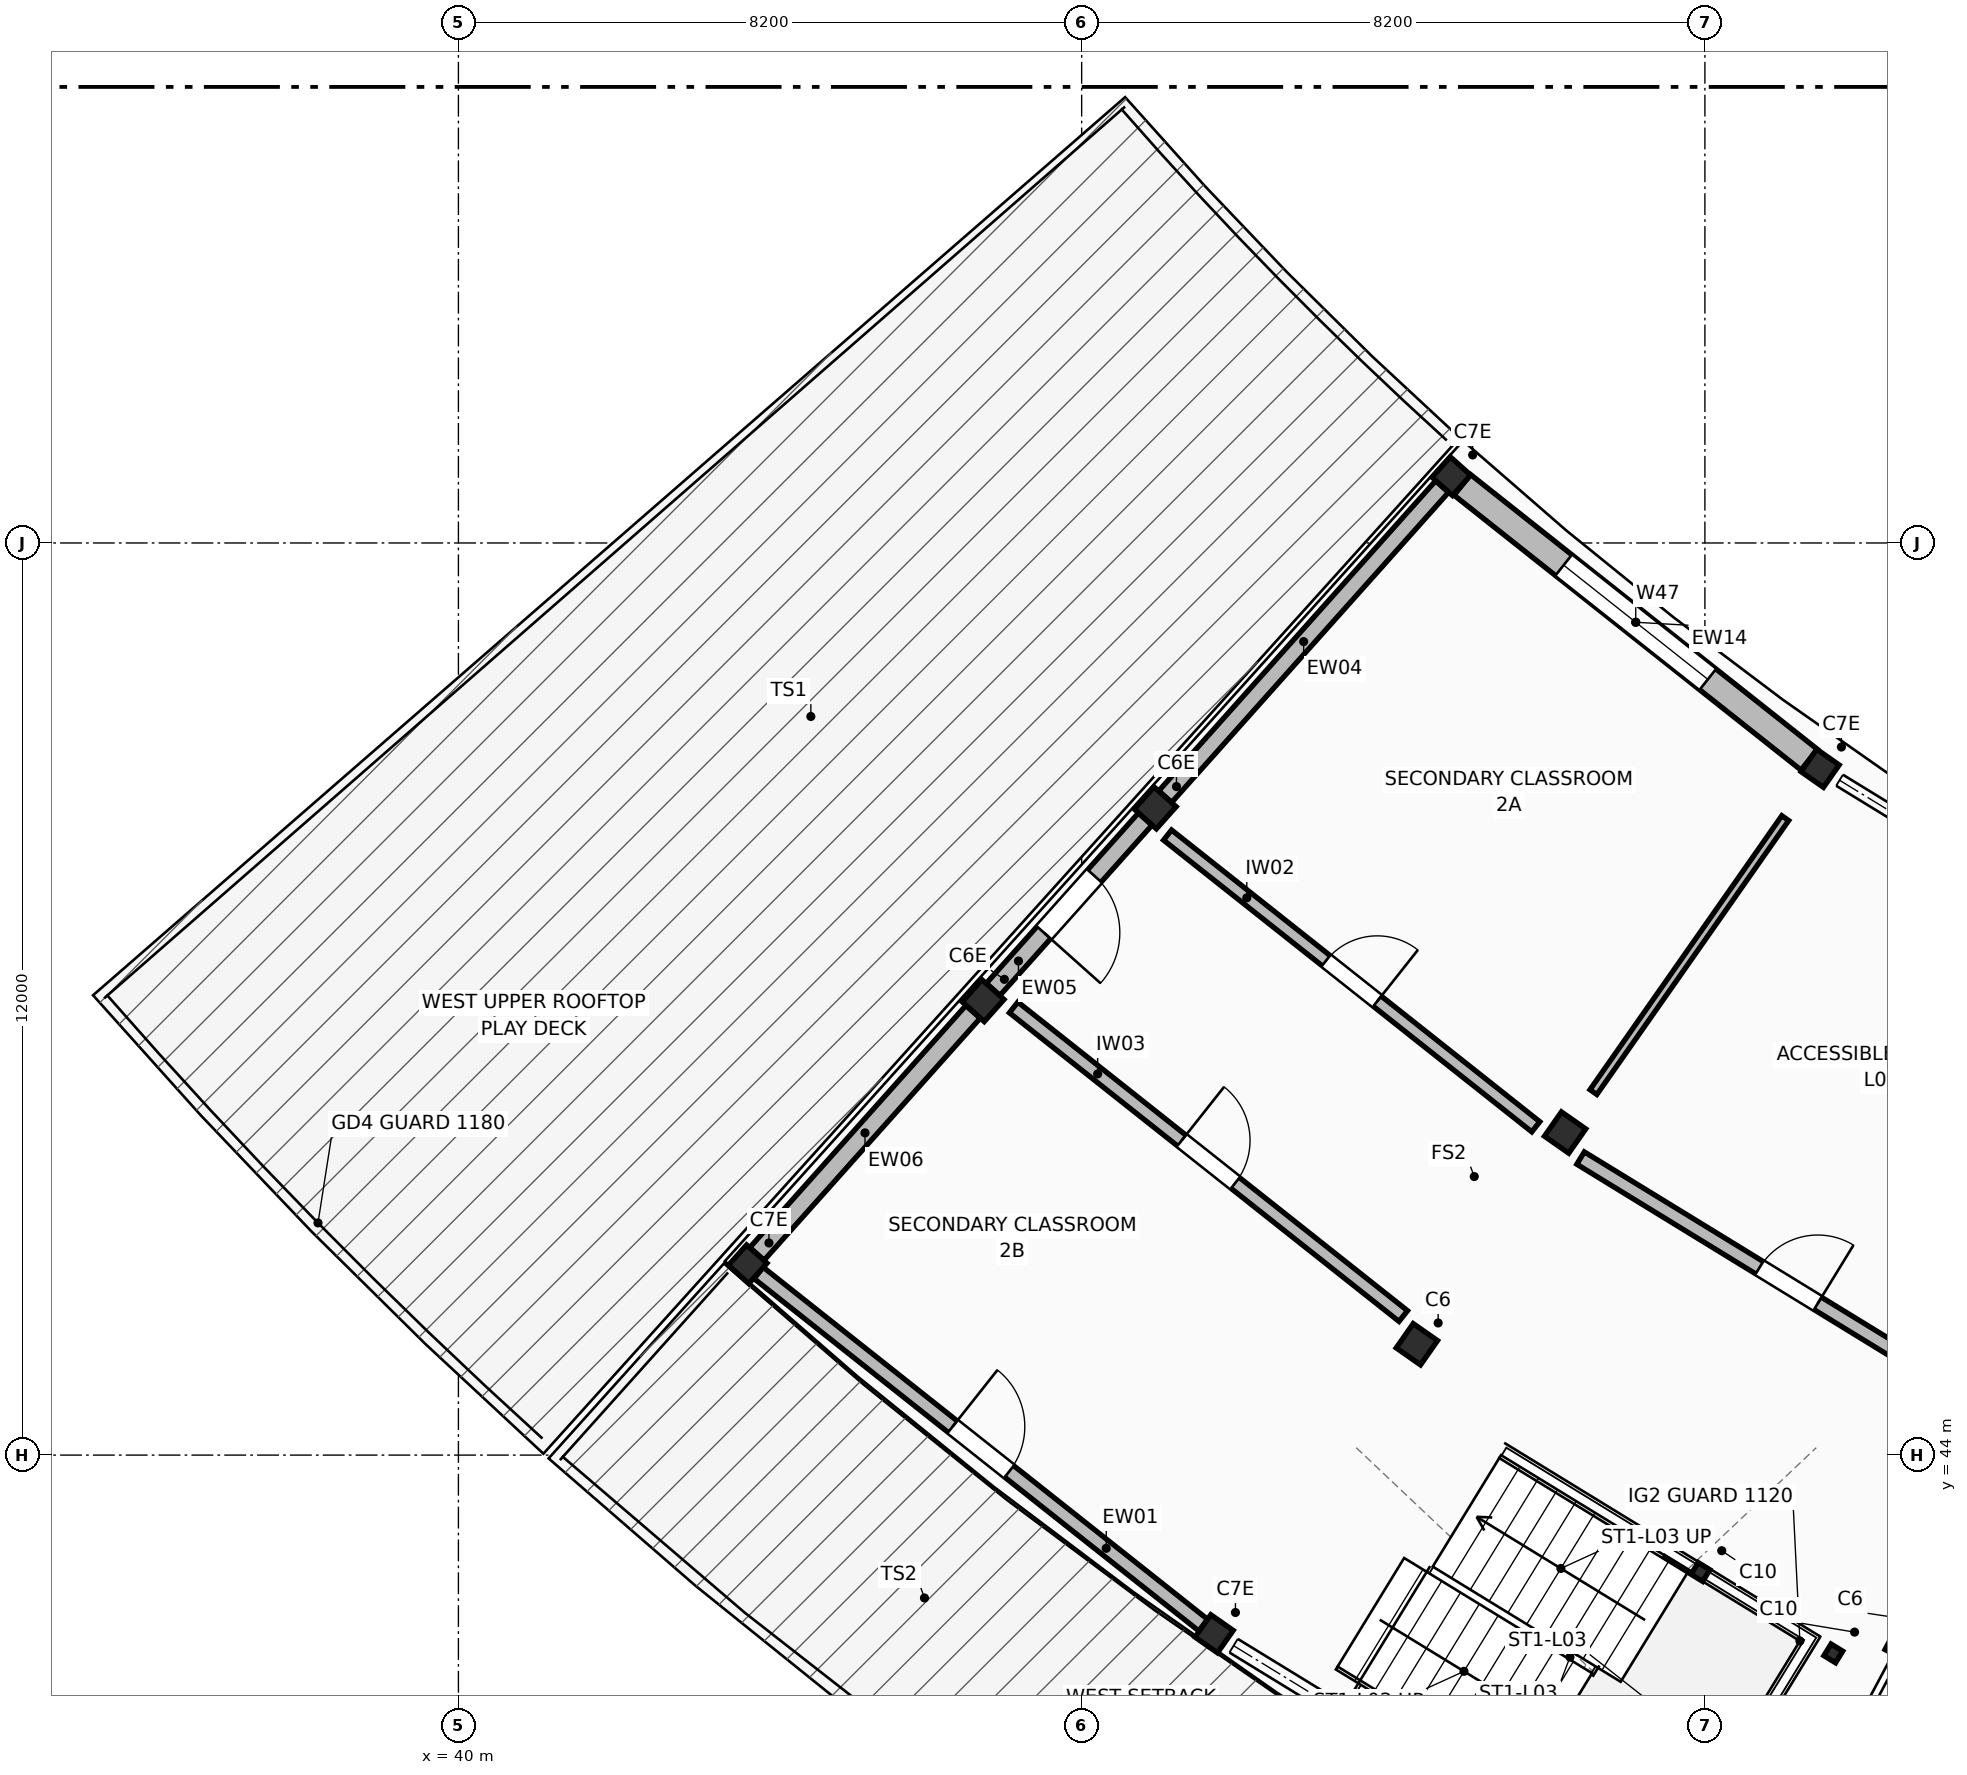
"""IFC4 building model, lengths in metres.
Left out: names, types, materials, properties, quantities, classifications, styles, units other than length and angle.
Written with IfcOpenShell. Run it as: python <this file> out.ifc"""

import sys

from ifc_helpers import new_model, si_unit, direction, frame, frame_2d, origin, origin_2d, place, context, subcontext, project, spatial, rectangle, hollow_rectangle, extrude, element, fill, save


model = new_model("IFC4")
c1 = context("Model", 3, precision=1e-05, world=origin(), true_north=direction((0.0, 1.0)))
c2 = subcontext(c1, "Body", "Model", "MODEL_VIEW")
j1 = project(units=[si_unit("LENGTHUNIT", "METRE"), si_unit("PLANEANGLEUNIT", "RADIAN")], contexts=[c1])
p1 = place(None, origin())
s1 = spatial("IfcSite", under=j1, at=p1, CompositionType="ELEMENT")
p2 = place(p1, origin())
s2 = spatial("IfcBuilding", under=s1, at=p2, CompositionType="ELEMENT")
p3 = place(p2, frame((0.0, 0.0, 11.9)))
s3 = spatial("IfcBuildingStorey", under=s2, at=p3, CompositionType="ELEMENT", Elevation=11.9)
p4 = place(p3, frame((53.064, 56.879, 0.0), z_axis=(0.0, 0.0, 1.0), x_axis=(-0.66614204858, -0.745824893064, 0.0)))
e1 = element("IfcColumn", 1, at=p4, inside=s3, PredefinedType="COLUMN", context=c2, shape_type="SweptSolid", body=[
    extrude(rectangle(XDim=0.36, YDim=0.36, at=origin_2d()), origin(), (0.0, 0.0, 1.0), 3.74),
])
for number, where, z_axis, x_axis in (
    (2, (49.167, 52.515, 0.0), (0.0, 0.0, 1.0), (-0.666, -0.746, 0.0)),
    (3, (46.903, 49.979, 0.0), (0.0, 0.0, 1.0), (-0.666, -0.746, 0.0)),
):
    element("IfcColumn", number, at=place(p3, frame(where, z_axis=z_axis, x_axis=x_axis)), inside=s3, PredefinedType="COLUMN", context=c2, shape_type="SweptSolid", body=[
        extrude(rectangle(XDim=0.39, YDim=0.39, at=origin_2d()), origin(), (0.0, 0.0, 1.0), 3.74),
    ])
for number, where, z_axis, x_axis in (
    (4, (43.806, 46.511, 0.0), (0.0, 0.0, 1.0), (-0.666, -0.746, 0.0)),
    (5, (57.916, 53.035, 0.0), (0.0, 0.0, 1.0), (-0.574, -0.819, 0.0)),
):
    element("IfcColumn", number, at=place(p3, frame(where, z_axis=z_axis, x_axis=x_axis)), inside=s3, PredefinedType="COLUMN", context=c2, shape_type="SweptSolid", body=[
        extrude(rectangle(XDim=0.36, YDim=0.36, at=origin_2d()), origin(), (0.0, 0.0, 1.0), 3.74),
    ])
for number, where, z_axis, x_axis in (
    (6, (54.561, 48.243, 0.0), (0.0, 0.0, 1.0), (-0.574, -0.819, 0.0)),
    (7, (52.61, 45.458, 0.0), (0.0, 0.0, 1.0), (-0.574, -0.819, 0.0)),
):
    element("IfcColumn", number, at=place(p3, frame(where, z_axis=z_axis, x_axis=x_axis)), inside=s3, PredefinedType="COLUMN", context=c2, shape_type="SweptSolid", body=[
        extrude(rectangle(XDim=0.39, YDim=0.39, at=origin_2d()), origin(), (0.0, 0.0, 1.0), 3.74),
    ])
p5 = place(p3, frame((49.943, 41.649, 0.0), z_axis=(0.0, 0.0, 1.0), x_axis=(-0.573576436351, -0.819152044289, 0.0)))
e8 = element("IfcColumn", 8, at=p5, inside=s3, PredefinedType="COLUMN", context=c2, shape_type="SweptSolid", body=[
    extrude(rectangle(XDim=0.36, YDim=0.36, at=origin_2d()), origin(), (0.0, 0.0, 1.0), 3.74),
])
p6 = place(p3, frame((59.034, 41.522, 0.0), z_axis=(0.0, 0.0, 1.0), x_axis=(-0.469471562786, -0.882947592859, 0.0)))
e9 = element("IfcColumn", 9, at=p6, inside=s3, PredefinedType="COLUMN", context=c2, shape_type="SweptSolid", body=[
    extrude(rectangle(XDim=0.39, YDim=0.39, at=origin_2d()), origin(), (0.0, 0.0, 1.0), 3.74),
])
p7 = place(p3, frame((53.208, 56.765, 0.0), z_axis=(0.0, 0.0, 1.0), x_axis=(0.783894481117, -0.620894067031, 0.0)))
e10 = element("IfcWall", 10, at=p7, inside=s3, PredefinedType="STANDARD", context=c2, shape_type="SweptSolid", body=[
    extrude(rectangle(XDim=5.823, YDim=0.348, at=frame_2d((2.912, 0.0))), origin(), (0.0, 0.0, 1.0), 2.8),
])
p8 = place(p7, frame((1.702, 0.0, 0.95)))
e11 = element("IfcOpeningElement", 11, at=p8, cuts=e10, PredefinedType="OPENING", context=c2, shape_type="SweptSolid", body=[
    extrude(rectangle(XDim=2.42, YDim=1.45, at=frame_2d((1.21, 0.725))), frame((0.0, 0.184, 0.0), z_axis=(0.0, -1.0, 0.0), x_axis=(1.0, 0.0, 0.0)), (0.0, 0.0, 1.0), 0.368),
])
p9 = place(p3, frame((43.949, 46.397, 0.0), z_axis=(0.0, 0.0, 1.0), x_axis=(0.783891257523, -0.620898136879, 0.0)))
e12 = element("IfcWall", 12, at=p9, inside=s3, PredefinedType="STANDARD", context=c2, shape_type="SweptSolid", body=[
    extrude(rectangle(XDim=7.464, YDim=0.192, at=frame_2d((3.732, 0.0))), origin(), (0.0, 0.0, 1.0), 2.8),
])
p10 = place(p9, frame((3.257, 0.0, 0.0)))
e13 = element("IfcOpeningElement", 13, at=p10, cuts=e12, PredefinedType="OPENING", context=c2, shape_type="SweptSolid", body=[
    extrude(rectangle(XDim=0.95, YDim=2.15, at=frame_2d((0.475, 1.075))), frame((0.0, 0.106, 0.0), z_axis=(0.0, -1.0, 0.0), x_axis=(1.0, 0.0, 0.0)), (0.0, 0.0, 1.0), 0.212),
])
p11 = place(p3, frame((52.942, 56.742, 0.0), z_axis=(0.0, 0.0, 1.0), x_axis=(-0.666068996659, -0.745890133793, 0.0)))
e14 = element("IfcWall", 14, at=p11, inside=s3, PredefinedType="STANDARD", context=c2, shape_type="SweptSolid", body=[
    extrude(rectangle(XDim=5.469, YDim=0.228, at=frame_2d((2.734, 0.0))), origin(), (0.0, 0.0, 1.0), 2.8),
])
p12 = place(p3, frame((49.036, 52.367, 0.0), z_axis=(0.0, 0.0, 1.0), x_axis=(-0.666077136643, -0.745882864826, 0.0)))
e15 = element("IfcWall", 15, at=p12, inside=s3, PredefinedType="STANDARD", context=c2, shape_type="SweptSolid", body=[
    extrude(rectangle(XDim=3.004, YDim=0.24, at=frame_2d((1.502, 0.0))), origin(), (0.0, 0.0, 1.0), 2.8),
])
p13 = place(p12, frame((1.002, 0.0, 0.0)))
e16 = element("IfcOpeningElement", 16, at=p13, cuts=e15, PredefinedType="OPENING", context=c2, shape_type="SweptSolid", body=[
    extrude(rectangle(XDim=1.0, YDim=2.15, at=frame_2d((0.5, 1.075))), frame((0.0, 0.13, 0.0), z_axis=(0.0, -1.0, 0.0), x_axis=(1.0, 0.0, 0.0)), (0.0, 0.0, 1.0), 0.26),
])
p14 = place(p3, frame((46.771, 49.832, 0.0), z_axis=(0.0, 0.0, 1.0), x_axis=(-0.666062362194, -0.74589605822, 0.0)))
e17 = element("IfcWall", 17, at=p14, inside=s3, PredefinedType="STANDARD", context=c2, shape_type="SweptSolid", body=[
    extrude(rectangle(XDim=4.269, YDim=0.252, at=frame_2d((2.135, 0.0))), origin(), (0.0, 0.0, 1.0), 2.8),
])
for number, where, z_axis, x_axis in (
    (18, (56.341, 42.462, 0.0), (0.0, 0.0, 1.0), (0.853, -0.522, 0.0)),
    (19, (58.089, 41.391, 0.0), (0.0, 0.0, 1.0), (0.853, -0.522, 0.0)),
):
    element("IfcColumn", number, at=place(p3, frame(where, z_axis=z_axis, x_axis=x_axis)), inside=s3, PredefinedType="COLUMN", context=c2, shape_type="SweptSolid", body=[
        extrude(hollow_rectangle(XDim=0.18, YDim=0.18, WallThickness=0.01, InnerFilletRadius=0.01, OuterFilletRadius=0.02, at=origin_2d()), origin(), (0.0, 0.0, 1.0), 1.675),
    ])
p15 = place(p3, frame((49.33, 52.157, 0.0), z_axis=(0.0, 0.0, 1.0), x_axis=(0.783880806515, -0.620911331171, 0.0)))
e20 = element("IfcWall", 20, at=p15, inside=s3, PredefinedType="STANDARD", context=c2, shape_type="SweptSolid", body=[
    extrude(rectangle(XDim=6.181, YDim=0.17, at=frame_2d((3.091, 0.0))), origin(), (0.0, 0.0, 1.0), 2.75),
])
p16 = place(p15, frame((2.66, 0.0, 0.0)))
e21 = element("IfcOpeningElement", 21, at=p16, cuts=e20, PredefinedType="OPENING", context=c2, shape_type="SweptSolid", body=[
    extrude(rectangle(XDim=0.86, YDim=2.24, at=frame_2d((0.43, 1.12))), frame((0.0, 0.095, 0.0), z_axis=(0.0, -1.0, 0.0), x_axis=(1.0, 0.0, 0.0)), (0.0, 0.0, 1.0), 0.19),
])
p17 = place(p3, frame((47.305, 49.89, 0.0), z_axis=(0.0, 0.0, 1.0), x_axis=(0.783889859425, -0.620899901989, 0.0)))
e22 = element("IfcWall", 22, at=p17, inside=s3, PredefinedType="STANDARD", context=c2, shape_type="SweptSolid", body=[
    extrude(rectangle(XDim=6.54, YDim=0.18, at=frame_2d((3.27, 0.0))), origin(), (0.0, 0.0, 1.0), 2.75),
])
p18 = place(p17, frame((2.82, 0.0, 0.0)))
e23 = element("IfcOpeningElement", 23, at=p18, cuts=e22, PredefinedType="OPENING", context=c2, shape_type="SweptSolid", body=[
    extrude(rectangle(XDim=0.9, YDim=2.06, at=frame_2d((0.45, 1.03))), frame((0.0, 0.1, 0.0), z_axis=(0.0, -1.0, 0.0), x_axis=(1.0, 0.0, 0.0)), (0.0, 0.0, 1.0), 0.2),
])
p19 = place(p3, frame((54.764, 47.908, 0.0), z_axis=(0.0, 0.0, 1.0), x_axis=(0.852626937867, -0.522520147767, 0.0)))
e24 = element("IfcWall", 24, at=p19, inside=s3, PredefinedType="STANDARD", context=c2, shape_type="SweptSolid", body=[
    extrude(rectangle(XDim=6.42, YDim=0.19, at=frame_2d((3.21, 0.0))), origin(), (0.0, 0.0, 1.0), 2.75),
])
p20 = place(p19, frame((2.76, 0.0, 0.0)))
e25 = element("IfcOpeningElement", 25, at=p20, cuts=e24, PredefinedType="OPENING", context=c2, shape_type="SweptSolid", body=[
    extrude(rectangle(XDim=0.9, YDim=2.12, at=frame_2d((0.45, 1.06))), frame((0.0, 0.105, 0.0), z_axis=(0.0, -1.0, 0.0), x_axis=(1.0, 0.0, 0.0)), (0.0, 0.0, 1.0), 0.21),
])
p21 = place(p3, frame((57.457, 52.38, 0.0), z_axis=(0.0, 0.0, 1.0), x_axis=(-0.573570334442, -0.819156316858, 0.0)))
e26 = element("IfcWall", 26, at=p21, inside=s3, PredefinedType="PARTITIONING", context=c2, shape_type="SweptSolid", body=[
    extrude(rectangle(XDim=4.4, YDim=0.11, at=frame_2d((2.2, 0.0))), origin(), (0.0, 0.0, 1.0), 2.75),
])
p22 = place(p8, origin())
e27 = element("IfcWindow", 27, at=p22, inside=s3, PartitioningType="SINGLE_PANEL", PredefinedType="WINDOW", context=c2, shape_type="SweptSolid", body=[
    extrude(rectangle(XDim=2.42, YDim=1.45, at=frame_2d((1.21, 0.725))), frame((0.0, 0.03, 0.0), z_axis=(0.0, -1.0, 0.0), x_axis=(1.0, 0.0, 0.0)), (0.0, 0.0, 1.0), 0.06),
])
fill(e11, e27)
p23 = place(p10, frame((0.95, 0.0, 0.0), z_axis=(0.0, 0.0, 1.0), x_axis=(-1.0, 0.0, 0.0)))
e28 = element("IfcDoor", 28, at=p23, inside=s3, OperationType="SINGLE_SWING_LEFT", PredefinedType="DOOR", context=c2, shape_type="SweptSolid", body=[
    extrude(rectangle(XDim=0.95, YDim=2.15, at=frame_2d((0.475, 1.075))), frame((0.0, 0.025, 0.0), z_axis=(0.0, -1.0, 0.0), x_axis=(1.0, 0.0, 0.0)), (0.0, 0.0, 1.0), 0.05),
])
fill(e13, e28)
p24 = place(p13, frame((1.0, 0.0, 0.0), z_axis=(0.0, 0.0, 1.0), x_axis=(-1.0, 0.0, 0.0)))
e29 = element("IfcDoor", 29, at=p24, inside=s3, OperationType="SINGLE_SWING_RIGHT", PredefinedType="DOOR", context=c2, shape_type="SweptSolid", body=[
    extrude(rectangle(XDim=1.0, YDim=2.15, at=frame_2d((0.5, 1.075))), frame((0.0, 0.025, 0.0), z_axis=(0.0, -1.0, 0.0), x_axis=(1.0, 0.0, 0.0)), (0.0, 0.0, 1.0), 0.05),
])
fill(e16, e29)
p25 = place(p16, frame((0.86, 0.0, 0.0), z_axis=(0.0, 0.0, 1.0), x_axis=(-1.0, 0.0, 0.0)))
e30 = element("IfcDoor", 30, at=p25, inside=s3, OperationType="SINGLE_SWING_RIGHT", PredefinedType="DOOR", context=c2, shape_type="SweptSolid", body=[
    extrude(rectangle(XDim=0.86, YDim=2.24, at=frame_2d((0.43, 1.12))), frame((0.0, 0.025, 0.0), z_axis=(0.0, -1.0, 0.0), x_axis=(1.0, 0.0, 0.0)), (0.0, 0.0, 1.0), 0.05),
])
fill(e21, e30)
p26 = place(p18, origin())
e31 = element("IfcDoor", 31, at=p26, inside=s3, OperationType="SINGLE_SWING_LEFT", PredefinedType="DOOR", context=c2, shape_type="SweptSolid", body=[
    extrude(rectangle(XDim=0.9, YDim=2.06, at=frame_2d((0.45, 1.03))), frame((0.0, 0.025, 0.0), z_axis=(0.0, -1.0, 0.0), x_axis=(1.0, 0.0, 0.0)), (0.0, 0.0, 1.0), 0.05),
])
fill(e23, e31)
p27 = place(p20, frame((0.9, 0.0, 0.0), z_axis=(0.0, 0.0, 1.0), x_axis=(-1.0, 0.0, 0.0)))
e32 = element("IfcDoor", 32, at=p27, inside=s3, OperationType="SINGLE_SWING_RIGHT", PredefinedType="DOOR", context=c2, shape_type="SweptSolid", body=[
    extrude(rectangle(XDim=0.9, YDim=2.12, at=frame_2d((0.45, 1.06))), frame((0.0, 0.025, 0.0), z_axis=(0.0, -1.0, 0.0), x_axis=(1.0, 0.0, 0.0)), (0.0, 0.0, 1.0), 0.05),
])
fill(e25, e32)
save(model, sys.argv[1])
